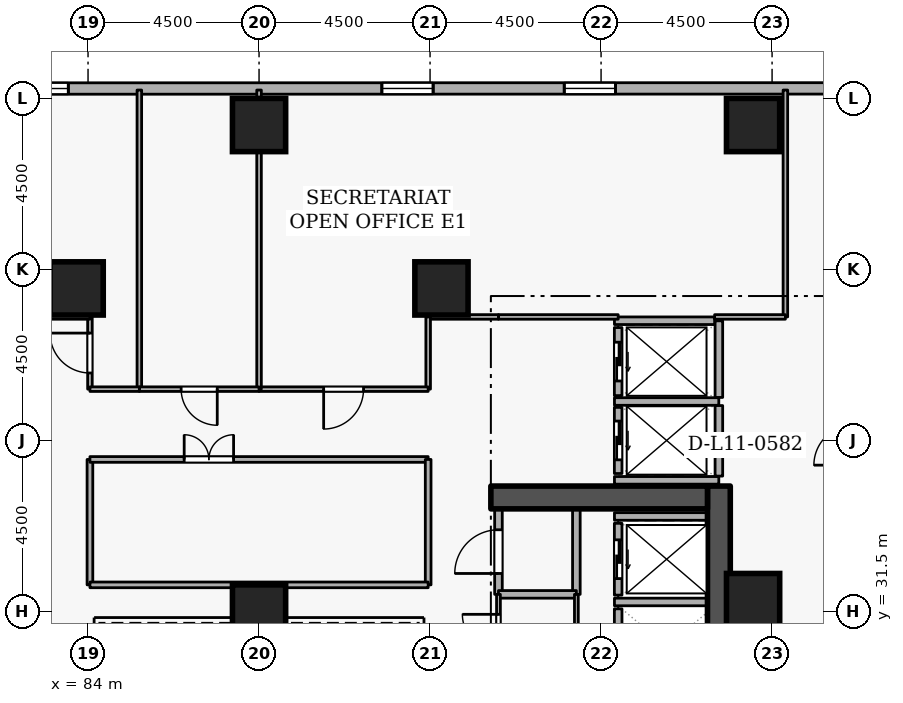
"""IFC4 building model, lengths in metres.
Left out: names, types, materials, properties, quantities, classifications, styles, units other than length and angle.
Written with IfcOpenShell. Run it as: python <this file> out.ifc"""

import sys

from ifc_helpers import new_model, si_unit, direction, frame, frame_2d, origin, origin_2d, place, context, subcontext, project, spatial, rectangle, extrude, element, fill, save


model = new_model("IFC4")
c1 = context("Model", 3, precision=1e-05, world=origin(), true_north=direction((0.0, 1.0)))
c2 = subcontext(c1, "Body", "Model", "MODEL_VIEW")
j1 = project(units=[si_unit("LENGTHUNIT", "METRE"), si_unit("PLANEANGLEUNIT", "RADIAN")], contexts=[c1])
p1 = place(None, origin())
s1 = spatial("IfcSite", under=j1, at=p1, CompositionType="ELEMENT")
p2 = place(p1, origin())
s2 = spatial("IfcBuilding", under=s1, at=p2, CompositionType="ELEMENT")
p3 = place(p2, frame((0.0, 0.0, 45.9)))
s3 = spatial("IfcBuildingStorey", under=s2, at=p3, CompositionType="ELEMENT", Elevation=45.9)
p4 = place(p3, frame((100.6, 19.2, 0.0), z_axis=(0.0, 0.0, 1.0), x_axis=(0.0, 1.0, 0.0)))
e1 = element("IfcWall", 1, at=p4, inside=s3, PredefinedType="SHEAR", context=c2, shape_type="SweptSolid", body=[
    extrude(rectangle(XDim=15.6, YDim=0.6, at=frame_2d((7.8, 0.0))), origin(), (0.0, 0.0, 1.0), 3.6),
])
p5 = place(p3, frame((94.6, 34.5, 0.0), z_axis=(0.0, 0.0, 1.0), x_axis=(1.0, 0.0, 0.0)))
e2 = element("IfcWall", 2, at=p5, inside=s3, PredefinedType="SHEAR", context=c2, shape_type="SweptSolid", body=[
    extrude(rectangle(XDim=5.7, YDim=0.6, at=frame_2d((2.85, 0.0))), origin(), (0.0, 0.0, 1.0), 3.6),
])
for number, where, z_axis, x_axis in (
    (3, (101.5, 44.3, 0.0), (0.0, 0.0, 1.0), (1.0, 0.0, 0.0)),
    (4, (88.5, 44.3, 0.0), (0.0, 0.0, 1.0), (1.0, 0.0, 0.0)),
    (5, (93.3, 40.0, 0.0), (0.0, 0.0, 1.0), (1.0, 0.0, 0.0)),
    (6, (83.7, 40.0, 0.0), (0.0, 0.0, 1.0), (1.0, 0.0, 0.0)),
    (7, (101.5, 31.8, 0.0), (0.0, 0.0, 1.0), (1.0, 0.0, 0.0)),
    (8, (88.5, 31.5, 0.0), (0.0, 0.0, 1.0), (1.0, 0.0, 0.0)),
):
    element("IfcColumn", number, at=place(p3, frame(where, z_axis=z_axis, x_axis=x_axis)), inside=s3, PredefinedType="COLUMN", context=c2, shape_type="SweptSolid", body=[
        extrude(rectangle(XDim=1.4, YDim=1.4, at=origin_2d()), origin(), (0.0, 0.0, 1.0), 3.6),
    ])
p6 = place(p3, frame((110.181, 45.265, 0.0), z_axis=(0.0, 0.0, 1.0), x_axis=(-0.999999983929, -0.00017928314, 0.0)))
e9 = element("IfcWall", 9, at=p6, inside=s3, PredefinedType="STANDARD", context=c2, shape_type="SweptSolid", body=[
    extrude(rectangle(XDim=35.406, YDim=0.3, at=frame_2d((17.703, 0.0))), origin(), (0.0, 0.0, 1.0), 2.22),
])
p7 = place(p6, frame((2.7, 0.0, 0.72)))
e10 = element("IfcOpeningElement", 10, at=p7, cuts=e9, PredefinedType="OPENING", context=c2, shape_type="SweptSolid", body=[
    extrude(rectangle(XDim=1.35, YDim=1.05, at=frame_2d((0.675, 0.525))), frame((0.0, 0.16, 0.0), z_axis=(0.0, -1.0, 0.0), x_axis=(1.0, 0.0, 0.0)), (0.0, 0.0, 1.0), 0.32),
])
p8 = place(p6, frame((12.3, 0.0, 0.72)))
e11 = element("IfcOpeningElement", 11, at=p8, cuts=e9, PredefinedType="OPENING", context=c2, shape_type="SweptSolid", body=[
    extrude(rectangle(XDim=1.35, YDim=1.05, at=frame_2d((0.675, 0.525))), frame((0.0, 0.16, 0.0), z_axis=(0.0, -1.0, 0.0), x_axis=(1.0, 0.0, 0.0)), (0.0, 0.0, 1.0), 0.32),
])
p9 = place(p6, frame((17.1, 0.0, 0.72)))
e12 = element("IfcOpeningElement", 12, at=p9, cuts=e9, PredefinedType="OPENING", context=c2, shape_type="SweptSolid", body=[
    extrude(rectangle(XDim=1.35, YDim=1.05, at=frame_2d((0.675, 0.525))), frame((0.0, 0.16, 0.0), z_axis=(0.0, -1.0, 0.0), x_axis=(1.0, 0.0, 0.0)), (0.0, 0.0, 1.0), 0.32),
])
p10 = place(p6, frame((26.7, 0.0, 0.72)))
e13 = element("IfcOpeningElement", 13, at=p10, cuts=e9, PredefinedType="OPENING", context=c2, shape_type="SweptSolid", body=[
    extrude(rectangle(XDim=1.35, YDim=1.05, at=frame_2d((0.675, 0.525))), frame((0.0, 0.16, 0.0), z_axis=(0.0, -1.0, 0.0), x_axis=(1.0, 0.0, 0.0)), (0.0, 0.0, 1.0), 0.32),
])
p11 = place(p6, frame((31.5, 0.0, 0.72)))
e14 = element("IfcOpeningElement", 14, at=p11, cuts=e9, PredefinedType="OPENING", context=c2, shape_type="SweptSolid", body=[
    extrude(rectangle(XDim=1.35, YDim=1.05, at=frame_2d((0.675, 0.525))), frame((0.0, 0.16, 0.0), z_axis=(0.0, -1.0, 0.0), x_axis=(1.0, 0.0, 0.0)), (0.0, 0.0, 1.0), 0.32),
])
p12 = place(p3, frame((97.95, 31.57, 0.0), z_axis=(0.0, 0.0, 1.0), x_axis=(0.0, -1.0, 0.0)))
e15 = element("IfcWall", 15, at=p12, inside=s3, PredefinedType="STANDARD", context=c2, shape_type="SweptSolid", body=[
    extrude(rectangle(XDim=1.99, YDim=0.2, at=frame_2d((0.995, 0.0))), origin(), (0.0, 0.0, 1.0), 3.26),
])
p13 = place(p3, frame((97.95, 33.82, 0.0), z_axis=(0.0, 0.0, 1.0), x_axis=(0.0, -1.0, 0.0)))
e16 = element("IfcWall", 16, at=p13, inside=s3, PredefinedType="STANDARD", context=c2, shape_type="SweptSolid", body=[
    extrude(rectangle(XDim=1.89, YDim=0.2, at=frame_2d((0.945, 0.0))), origin(), (0.0, 0.0, 1.0), 3.26),
])
p14 = place(p13, frame((0.435, 0.0, 0.0)))
e17 = element("IfcOpeningElement", 17, at=p14, cuts=e16, PredefinedType="OPENING", context=c2, shape_type="SweptSolid", body=[
    extrude(rectangle(XDim=1.02, YDim=2.06, at=frame_2d((0.51, 1.03))), frame((0.0, 0.11, 0.0), z_axis=(0.0, -1.0, 0.0), x_axis=(1.0, 0.0, 0.0)), (0.0, 0.0, 1.0), 0.22),
])
p15 = place(p3, frame((97.95, 36.87, 0.0), z_axis=(0.0, 0.0, 1.0), x_axis=(0.0, -1.0, 0.0)))
e18 = element("IfcWall", 18, at=p15, inside=s3, PredefinedType="STANDARD", context=c2, shape_type="SweptSolid", body=[
    extrude(rectangle(XDim=1.74, YDim=0.2, at=frame_2d((0.87, 0.0))), origin(), (0.0, 0.0, 1.0), 3.26),
])
p16 = place(p15, frame((0.36, 0.0, 0.0)))
e19 = element("IfcOpeningElement", 19, at=p16, cuts=e18, PredefinedType="OPENING", context=c2, shape_type="SweptSolid", body=[
    extrude(rectangle(XDim=1.02, YDim=2.06, at=frame_2d((0.51, 1.03))), frame((0.0, 0.11, 0.0), z_axis=(0.0, -1.0, 0.0), x_axis=(1.0, 0.0, 0.0)), (0.0, 0.0, 1.0), 0.22),
])
p17 = place(p3, frame((97.95, 38.97, 0.0), z_axis=(0.0, 0.0, 1.0), x_axis=(0.0, -1.0, 0.0)))
e20 = element("IfcWall", 20, at=p17, inside=s3, PredefinedType="STANDARD", context=c2, shape_type="SweptSolid", body=[
    extrude(rectangle(XDim=1.79, YDim=0.2, at=frame_2d((0.895, 0.0))), origin(), (0.0, 0.0, 1.0), 3.26),
])
p18 = place(p17, frame((0.385, 0.0, 0.0)))
e21 = element("IfcOpeningElement", 21, at=p18, cuts=e20, PredefinedType="OPENING", context=c2, shape_type="SweptSolid", body=[
    extrude(rectangle(XDim=1.02, YDim=2.06, at=frame_2d((0.51, 1.03))), frame((0.0, 0.11, 0.0), z_axis=(0.0, -1.0, 0.0), x_axis=(1.0, 0.0, 0.0)), (0.0, 0.0, 1.0), 0.22),
])
for number, where, z_axis, x_axis in (
    (22, (97.852, 31.75, 0.0), (0.0, 0.0, 1.0), (1.0, 0.0, 0.0)),
    (23, (97.852, 34.0, 0.0), (0.0, 0.0, 1.0), (1.0, 0.0, 0.0)),
):
    element("IfcWall", number, at=place(p3, frame(where, z_axis=z_axis, x_axis=x_axis)), inside=s3, PredefinedType="STANDARD", context=c2, shape_type="SweptSolid", body=[
        extrude(rectangle(XDim=2.436, YDim=0.2, at=frame_2d((1.218, 0.0))), origin(), (0.0, 0.0, 1.0), 3.26),
    ])
for number, where, z_axis, x_axis in (
    (24, (97.852, 37.025, 0.0), (0.0, 0.0, 1.0), (1.0, 0.0, 0.0)),
    (25, (97.852, 34.95, 0.0), (0.0, 0.0, 1.0), (1.0, 0.0, 0.0)),
):
    element("IfcWall", number, at=place(p3, frame(where, z_axis=z_axis, x_axis=x_axis)), inside=s3, PredefinedType="STANDARD", context=c2, shape_type="SweptSolid", body=[
        extrude(rectangle(XDim=2.746, YDim=0.2, at=frame_2d((1.373, 0.0))), origin(), (0.0, 0.0, 1.0), 3.26),
    ])
p19 = place(p3, frame((100.6, 35.062, 0.0), z_axis=(0.0, 0.0, 1.0), x_axis=(0.0, 1.0, 0.0)))
e26 = element("IfcWall", 26, at=p19, inside=s3, PredefinedType="STANDARD", context=c2, shape_type="SweptSolid", body=[
    extrude(rectangle(XDim=1.856, YDim=0.2, at=frame_2d((0.928, 0.0))), origin(), (0.0, 0.0, 1.0), 3.26),
])
p20 = place(p3, frame((100.6, 37.132, 0.0), z_axis=(0.0, 0.0, 1.0), x_axis=(0.0, 1.0, 0.0)))
e27 = element("IfcWall", 27, at=p20, inside=s3, PredefinedType="STANDARD", context=c2, shape_type="SweptSolid", body=[
    extrude(rectangle(XDim=2.016, YDim=0.2, at=frame_2d((1.008, 0.0))), origin(), (0.0, 0.0, 1.0), 3.26),
])
p21 = place(p3, frame((97.852, 39.15, 0.0), z_axis=(0.0, 0.0, 1.0), x_axis=(1.0, 0.0, 0.0)))
e28 = element("IfcWall", 28, at=p21, inside=s3, PredefinedType="STANDARD", context=c2, shape_type="SweptSolid", body=[
    extrude(rectangle(XDim=2.636, YDim=0.2, at=frame_2d((1.318, 0.0))), origin(), (0.0, 0.0, 1.0), 3.26),
])
p22 = place(p3, frame((94.8, 31.95, 0.0), z_axis=(0.0, 0.0, 1.0), x_axis=(0.0, 1.0, 0.0)))
e29 = element("IfcWall", 29, at=p22, inside=s3, PredefinedType="STANDARD", context=c2, shape_type="SweptSolid", body=[
    extrude(rectangle(XDim=2.25, YDim=0.2, at=frame_2d((1.125, 0.0))), origin(), (0.0, 0.0, 1.0), 3.26),
])
p23 = place(p22, frame((0.55, 0.0, 0.0)))
e30 = element("IfcOpeningElement", 30, at=p23, cuts=e29, PredefinedType="OPENING", context=c2, shape_type="SweptSolid", body=[
    extrude(rectangle(XDim=1.15, YDim=2.1, at=frame_2d((0.575, 1.05))), frame((0.0, 0.11, 0.0), z_axis=(0.0, -1.0, 0.0), x_axis=(1.0, 0.0, 0.0)), (0.0, 0.0, 1.0), 0.22),
])
p24 = place(p3, frame((96.85, 34.2, 0.0), z_axis=(0.0, 0.0, 1.0), x_axis=(0.0, -1.0, 0.0)))
e31 = element("IfcWall", 31, at=p24, inside=s3, PredefinedType="STANDARD", context=c2, shape_type="SweptSolid", body=[
    extrude(rectangle(XDim=2.25, YDim=0.2, at=frame_2d((1.125, 0.0))), origin(), (0.0, 0.0, 1.0), 3.26),
])
p25 = place(p3, frame((96.85, 31.95, 0.0), z_axis=(0.0, 0.0, 1.0), x_axis=(-1.0, 0.0, 0.0)))
e32 = element("IfcWall", 32, at=p25, inside=s3, PredefinedType="STANDARD", context=c2, shape_type="SweptSolid", body=[
    extrude(rectangle(XDim=2.05, YDim=0.2, at=frame_2d((1.025, 0.0))), origin(), (0.0, 0.0, 1.0), 3.26),
])
p26 = place(p3, frame((94.8, 29.95, 0.0), z_axis=(0.0, 0.0, 1.0), x_axis=(0.0, 1.0, 0.0)))
e33 = element("IfcWall", 33, at=p26, inside=s3, PredefinedType="PARTITIONING", context=c2, shape_type="SweptSolid", body=[
    extrude(rectangle(XDim=2.0, YDim=0.1, at=frame_2d((1.0, 0.0))), origin(), (0.0, 0.0, 1.0), 3.26),
])
p27 = place(p26, frame((0.525, 0.0, 0.0)))
e34 = element("IfcOpeningElement", 34, at=p27, cuts=e33, PredefinedType="OPENING", context=c2, shape_type="SweptSolid", body=[
    extrude(rectangle(XDim=0.95, YDim=2.1, at=frame_2d((0.475, 1.05))), frame((0.0, 0.06, 0.0), z_axis=(0.0, -1.0, 0.0), x_axis=(1.0, 0.0, 0.0)), (0.0, 0.0, 1.0), 0.12),
])
p28 = place(p3, frame((96.85, 31.95, 0.0), z_axis=(0.0, 0.0, 1.0), x_axis=(0.0, -1.0, 0.0)))
e35 = element("IfcWall", 35, at=p28, inside=s3, PredefinedType="PARTITIONING", context=c2, shape_type="SweptSolid", body=[
    extrude(rectangle(XDim=2.0, YDim=0.1, at=frame_2d((1.0, 0.0))), origin(), (0.0, 0.0, 1.0), 3.26),
])
p29 = place(p3, frame((97.95, 39.25, 0.0), z_axis=(0.0, 0.0, 1.0), x_axis=(-1.0, 0.0, 0.0)))
e36 = element("IfcWall", 36, at=p29, inside=s3, PredefinedType="PARTITIONING", context=c2, shape_type="SweptSolid", body=[
    extrude(rectangle(XDim=3.15, YDim=0.12, at=frame_2d((1.575, 0.0))), origin(), (0.0, 0.0, 1.0), 3.26),
])
p30 = place(p3, frame((94.8, 39.25, 0.0), z_axis=(0.0, 0.0, 1.0), x_axis=(-1.0, 0.0, 0.0)))
e37 = element("IfcWall", 37, at=p30, inside=s3, PredefinedType="PARTITIONING", context=c2, shape_type="SweptSolid", body=[
    extrude(rectangle(XDim=1.85, YDim=0.12, at=frame_2d((0.925, 0.0))), origin(), (0.0, 0.0, 1.0), 3.26),
])
p31 = place(p3, frame((92.95, 39.25, 0.0), z_axis=(0.0, 0.0, 1.0), x_axis=(0.0, -1.0, 0.0)))
e38 = element("IfcWall", 38, at=p31, inside=s3, PredefinedType="PARTITIONING", context=c2, shape_type="SweptSolid", body=[
    extrude(rectangle(XDim=1.9, YDim=0.12, at=frame_2d((0.95, 0.0))), origin(), (0.0, 0.0, 1.0), 3.26),
])
p32 = place(p3, frame((92.95, 37.35, 0.0), z_axis=(0.0, 0.0, 1.0), x_axis=(-1.0, 0.0, 0.0)))
e39 = element("IfcWall", 39, at=p32, inside=s3, PredefinedType="PARTITIONING", context=c2, shape_type="SweptSolid", body=[
    extrude(rectangle(XDim=4.45, YDim=0.12, at=frame_2d((2.225, 0.0))), origin(), (0.0, 0.0, 1.0), 3.26),
])
p33 = place(p32, frame((1.7, 0.0, 0.0)))
e40 = element("IfcOpeningElement", 40, at=p33, cuts=e39, PredefinedType="OPENING", context=c2, shape_type="SweptSolid", body=[
    extrude(rectangle(XDim=1.05, YDim=2.1, at=frame_2d((0.525, 1.05))), frame((0.0, 0.07, 0.0), z_axis=(0.0, -1.0, 0.0), x_axis=(1.0, 0.0, 0.0)), (0.0, 0.0, 1.0), 0.14),
])
p34 = place(p3, frame((88.5, 37.35, 0.0), z_axis=(0.0, 0.0, 1.0), x_axis=(0.0, 1.0, 0.0)))
e41 = element("IfcWall", 41, at=p34, inside=s3, PredefinedType="PARTITIONING", context=c2, shape_type="SweptSolid", body=[
    extrude(rectangle(XDim=7.87, YDim=0.12, at=frame_2d((3.935, 0.0))), origin(), (0.0, 0.0, 1.0), 1.685),
])
p35 = place(p3, frame((102.35, 45.22, 0.0), z_axis=(0.0, 0.0, 1.0), x_axis=(0.0, -1.0, 0.0)))
e42 = element("IfcWall", 42, at=p35, inside=s3, PredefinedType="PARTITIONING", context=c2, shape_type="SweptSolid", body=[
    extrude(rectangle(XDim=5.97, YDim=0.12, at=frame_2d((2.985, 0.0))), origin(), (0.0, 0.0, 1.0), 3.26),
])
p36 = place(p3, frame((102.35, 39.25, 0.0), z_axis=(0.0, 0.0, 1.0), x_axis=(-1.0, 0.0, 0.0)))
e43 = element("IfcWall", 43, at=p36, inside=s3, PredefinedType="PARTITIONING", context=c2, shape_type="SweptSolid", body=[
    extrude(rectangle(XDim=1.862, YDim=0.12, at=frame_2d((0.931, 0.0))), origin(), (0.0, 0.0, 1.0), 3.26),
])
p37 = place(p3, frame((85.35, 37.35, 0.0), z_axis=(0.0, 0.0, 1.0), x_axis=(0.0, 1.0, 0.0)))
e44 = element("IfcWall", 44, at=p37, inside=s3, PredefinedType="PARTITIONING", context=c2, shape_type="SweptSolid", body=[
    extrude(rectangle(XDim=7.87, YDim=0.12, at=frame_2d((3.935, 0.0))), origin(), (0.0, 0.0, 1.0), 3.26),
])
p38 = place(p3, frame((88.5, 37.35, 0.0), z_axis=(0.0, 0.0, 1.0), x_axis=(-1.0, 0.0, 0.0)))
e45 = element("IfcWall", 45, at=p38, inside=s3, PredefinedType="PARTITIONING", context=c2, shape_type="SweptSolid", body=[
    extrude(rectangle(XDim=3.15, YDim=0.12, at=frame_2d((1.575, 0.0))), origin(), (0.0, 0.0, 1.0), 3.26),
])
p39 = place(p38, frame((1.1, 0.0, 0.0)))
e46 = element("IfcOpeningElement", 46, at=p39, cuts=e45, PredefinedType="OPENING", context=c2, shape_type="SweptSolid", body=[
    extrude(rectangle(XDim=0.95, YDim=2.1, at=frame_2d((0.475, 1.05))), frame((0.0, 0.07, 0.0), z_axis=(0.0, -1.0, 0.0), x_axis=(1.0, 0.0, 0.0)), (0.0, 0.0, 1.0), 0.14),
])
p40 = place(p3, frame((84.05, 37.35, 0.0), z_axis=(0.0, 0.0, 1.0), x_axis=(0.0, 1.0, 0.0)))
e47 = element("IfcWall", 47, at=p40, inside=s3, PredefinedType="PARTITIONING", context=c2, shape_type="SweptSolid", body=[
    extrude(rectangle(XDim=1.9, YDim=0.12, at=frame_2d((0.95, 0.0))), origin(), (0.0, 0.0, 1.0), 3.26),
])
p41 = place(p40, frame((0.425, 0.0, 0.0)))
e48 = element("IfcOpeningElement", 48, at=p41, cuts=e47, PredefinedType="OPENING", context=c2, shape_type="SweptSolid", body=[
    extrude(rectangle(XDim=1.05, YDim=2.1, at=frame_2d((0.525, 1.05))), frame((0.0, 0.07, 0.0), z_axis=(0.0, -1.0, 0.0), x_axis=(1.0, 0.0, 0.0)), (0.0, 0.0, 1.0), 0.14),
])
p42 = place(p3, frame((84.05, 39.25, 0.0), z_axis=(0.0, 0.0, 1.0), x_axis=(-1.0, 0.0, 0.0)))
e49 = element("IfcWall", 49, at=p42, inside=s3, PredefinedType="PARTITIONING", context=c2, shape_type="SweptSolid", body=[
    extrude(rectangle(XDim=1.85, YDim=0.12, at=frame_2d((0.925, 0.0))), origin(), (0.0, 0.0, 1.0), 3.26),
])
p43 = place(p3, frame((85.35, 37.35, 0.0), z_axis=(0.0, 0.0, 1.0), x_axis=(-1.0, 0.0, 0.0)))
e50 = element("IfcWall", 50, at=p43, inside=s3, PredefinedType="PARTITIONING", context=c2, shape_type="SweptSolid", body=[
    extrude(rectangle(XDim=1.3, YDim=0.12, at=frame_2d((0.65, 0.0))), origin(), (0.0, 0.0, 1.0), 3.26),
])
p44 = place(p3, frame((84.05, 32.2, 0.0), z_axis=(0.0, 0.0, 1.0), x_axis=(0.0, 1.0, 0.0)))
e51 = element("IfcWall", 51, at=p44, inside=s3, PredefinedType="PARTITIONING", context=c2, shape_type="SweptSolid", body=[
    extrude(rectangle(XDim=3.3, YDim=0.15, at=frame_2d((1.65, 0.0))), origin(), (0.0, 0.0, 1.0), 3.26),
])
p45 = place(p3, frame((84.05, 35.5, 0.0), z_axis=(0.0, 0.0, 1.0), x_axis=(1.0, 0.0, 0.0)))
e52 = element("IfcWall", 52, at=p45, inside=s3, PredefinedType="PARTITIONING", context=c2, shape_type="SweptSolid", body=[
    extrude(rectangle(XDim=8.9, YDim=0.15, at=frame_2d((4.45, 0.0))), origin(), (0.0, 0.0, 1.0), 3.26),
])
p46 = place(p45, frame((2.48, 0.0, 0.0)))
e53 = element("IfcOpeningElement", 53, at=p46, cuts=e52, PredefinedType="OPENING", context=c2, shape_type="SweptSolid", body=[
    extrude(rectangle(XDim=1.3, YDim=2.12, at=frame_2d((0.65, 1.06))), frame((0.0, 0.085, 0.0), z_axis=(0.0, -1.0, 0.0), x_axis=(1.0, 0.0, 0.0)), (0.0, 0.0, 1.0), 0.17),
])
p47 = place(p3, frame((92.95, 35.5, 0.0), z_axis=(0.0, 0.0, 1.0), x_axis=(0.0, -1.0, 0.0)))
e54 = element("IfcWall", 54, at=p47, inside=s3, PredefinedType="PARTITIONING", context=c2, shape_type="SweptSolid", body=[
    extrude(rectangle(XDim=3.3, YDim=0.15, at=frame_2d((1.65, 0.0))), origin(), (0.0, 0.0, 1.0), 3.26),
])
p48 = place(p3, frame((92.95, 32.2, 0.0), z_axis=(0.0, 0.0, 1.0), x_axis=(-1.0, 0.0, 0.0)))
e55 = element("IfcWall", 55, at=p48, inside=s3, PredefinedType="PARTITIONING", context=c2, shape_type="SweptSolid", body=[
    extrude(rectangle(XDim=8.9, YDim=0.15, at=frame_2d((4.45, 0.0))), origin(), (0.0, 0.0, 1.0), 3.26),
])
p49 = place(p8, origin())
e56 = element("IfcWindow", 56, at=p49, inside=s3, PartitioningType="SINGLE_PANEL", PredefinedType="WINDOW", context=c2, shape_type="SweptSolid", body=[
    extrude(rectangle(XDim=1.35, YDim=1.05, at=frame_2d((0.675, 0.525))), frame((0.0, 0.03, 0.0), z_axis=(0.0, -1.0, 0.0), x_axis=(1.0, 0.0, 0.0)), (0.0, 0.0, 1.0), 0.06),
])
fill(e11, e56)
p50 = place(p9, origin())
e57 = element("IfcWindow", 57, at=p50, inside=s3, PartitioningType="SINGLE_PANEL", PredefinedType="WINDOW", context=c2, shape_type="SweptSolid", body=[
    extrude(rectangle(XDim=1.35, YDim=1.05, at=frame_2d((0.675, 0.525))), frame((0.0, 0.03, 0.0), z_axis=(0.0, -1.0, 0.0), x_axis=(1.0, 0.0, 0.0)), (0.0, 0.0, 1.0), 0.06),
])
fill(e12, e57)
p51 = place(p10, origin())
e58 = element("IfcWindow", 58, at=p51, inside=s3, PartitioningType="SINGLE_PANEL", PredefinedType="WINDOW", context=c2, shape_type="SweptSolid", body=[
    extrude(rectangle(XDim=1.35, YDim=1.05, at=frame_2d((0.675, 0.525))), frame((0.0, 0.03, 0.0), z_axis=(0.0, -1.0, 0.0), x_axis=(1.0, 0.0, 0.0)), (0.0, 0.0, 1.0), 0.06),
])
fill(e13, e58)
p52 = place(p14, origin())
e59 = element("IfcDoor", 59, at=p52, inside=s3, OperationType="SLIDING_TO_LEFT", PredefinedType="DOOR", context=c2, shape_type="SweptSolid", body=[
    extrude(rectangle(XDim=1.02, YDim=2.06, at=frame_2d((0.51, 1.03))), frame((0.0, 0.025, 0.0), z_axis=(0.0, -1.0, 0.0), x_axis=(1.0, 0.0, 0.0)), (0.0, 0.0, 1.0), 0.05),
])
fill(e17, e59)
p53 = place(p16, origin())
e60 = element("IfcDoor", 60, at=p53, inside=s3, OperationType="SLIDING_TO_LEFT", PredefinedType="DOOR", context=c2, shape_type="SweptSolid", body=[
    extrude(rectangle(XDim=1.02, YDim=2.06, at=frame_2d((0.51, 1.03))), frame((0.0, 0.025, 0.0), z_axis=(0.0, -1.0, 0.0), x_axis=(1.0, 0.0, 0.0)), (0.0, 0.0, 1.0), 0.05),
])
fill(e19, e60)
p54 = place(p18, origin())
e61 = element("IfcDoor", 61, at=p54, inside=s3, OperationType="SLIDING_TO_LEFT", PredefinedType="DOOR", context=c2, shape_type="SweptSolid", body=[
    extrude(rectangle(XDim=1.02, YDim=2.06, at=frame_2d((0.51, 1.03))), frame((0.0, 0.025, 0.0), z_axis=(0.0, -1.0, 0.0), x_axis=(1.0, 0.0, 0.0)), (0.0, 0.0, 1.0), 0.05),
])
fill(e21, e61)
p55 = place(p27, origin())
e62 = element("IfcDoor", 62, at=p55, inside=s3, OperationType="SINGLE_SWING_RIGHT", PredefinedType="DOOR", context=c2, shape_type="SweptSolid", body=[
    extrude(rectangle(XDim=0.95, YDim=2.1, at=frame_2d((0.475, 1.05))), frame((0.0, 0.025, 0.0), z_axis=(0.0, -1.0, 0.0), x_axis=(1.0, 0.0, 0.0)), (0.0, 0.0, 1.0), 0.05),
])
fill(e34, e62)
p56 = place(p23, origin())
e63 = element("IfcDoor", 63, at=p56, inside=s3, OperationType="SINGLE_SWING_LEFT", PredefinedType="DOOR", context=c2, shape_type="SweptSolid", body=[
    extrude(rectangle(XDim=1.15, YDim=2.1, at=frame_2d((0.575, 1.05))), frame((0.0, 0.025, 0.0), z_axis=(0.0, -1.0, 0.0), x_axis=(1.0, 0.0, 0.0)), (0.0, 0.0, 1.0), 0.05),
])
fill(e30, e63)
p57 = place(p33, origin())
e64 = element("IfcDoor", 64, at=p57, inside=s3, OperationType="SINGLE_SWING_RIGHT", PredefinedType="DOOR", context=c2, shape_type="SweptSolid", body=[
    extrude(rectangle(XDim=1.05, YDim=2.1, at=frame_2d((0.525, 1.05))), frame((0.0, 0.025, 0.0), z_axis=(0.0, -1.0, 0.0), x_axis=(1.0, 0.0, 0.0)), (0.0, 0.0, 1.0), 0.05),
])
fill(e40, e64)
p58 = place(p39, origin())
e65 = element("IfcDoor", 65, at=p58, inside=s3, OperationType="SINGLE_SWING_LEFT", PredefinedType="DOOR", context=c2, shape_type="SweptSolid", body=[
    extrude(rectangle(XDim=0.95, YDim=2.1, at=frame_2d((0.475, 1.05))), frame((0.0, 0.025, 0.0), z_axis=(0.0, -1.0, 0.0), x_axis=(1.0, 0.0, 0.0)), (0.0, 0.0, 1.0), 0.05),
])
fill(e46, e65)
p59 = place(p41, origin())
e66 = element("IfcDoor", 66, at=p59, inside=s3, OperationType="SINGLE_SWING_RIGHT", PredefinedType="DOOR", context=c2, shape_type="SweptSolid", body=[
    extrude(rectangle(XDim=1.05, YDim=2.1, at=frame_2d((0.525, 1.05))), frame((0.0, 0.025, 0.0), z_axis=(0.0, -1.0, 0.0), x_axis=(1.0, 0.0, 0.0)), (0.0, 0.0, 1.0), 0.05),
])
fill(e48, e66)
p60 = place(p46, origin())
e67 = element("IfcDoor", 67, at=p60, inside=s3, OperationType="DOUBLE_DOOR_SINGLE_SWING", PredefinedType="DOOR", context=c2, shape_type="SweptSolid", body=[
    extrude(rectangle(XDim=1.3, YDim=2.12, at=frame_2d((0.65, 1.06))), frame((0.0, 0.025, 0.0), z_axis=(0.0, -1.0, 0.0), x_axis=(1.0, 0.0, 0.0)), (0.0, 0.0, 1.0), 0.05),
])
fill(e53, e67)
save(model, sys.argv[1])
